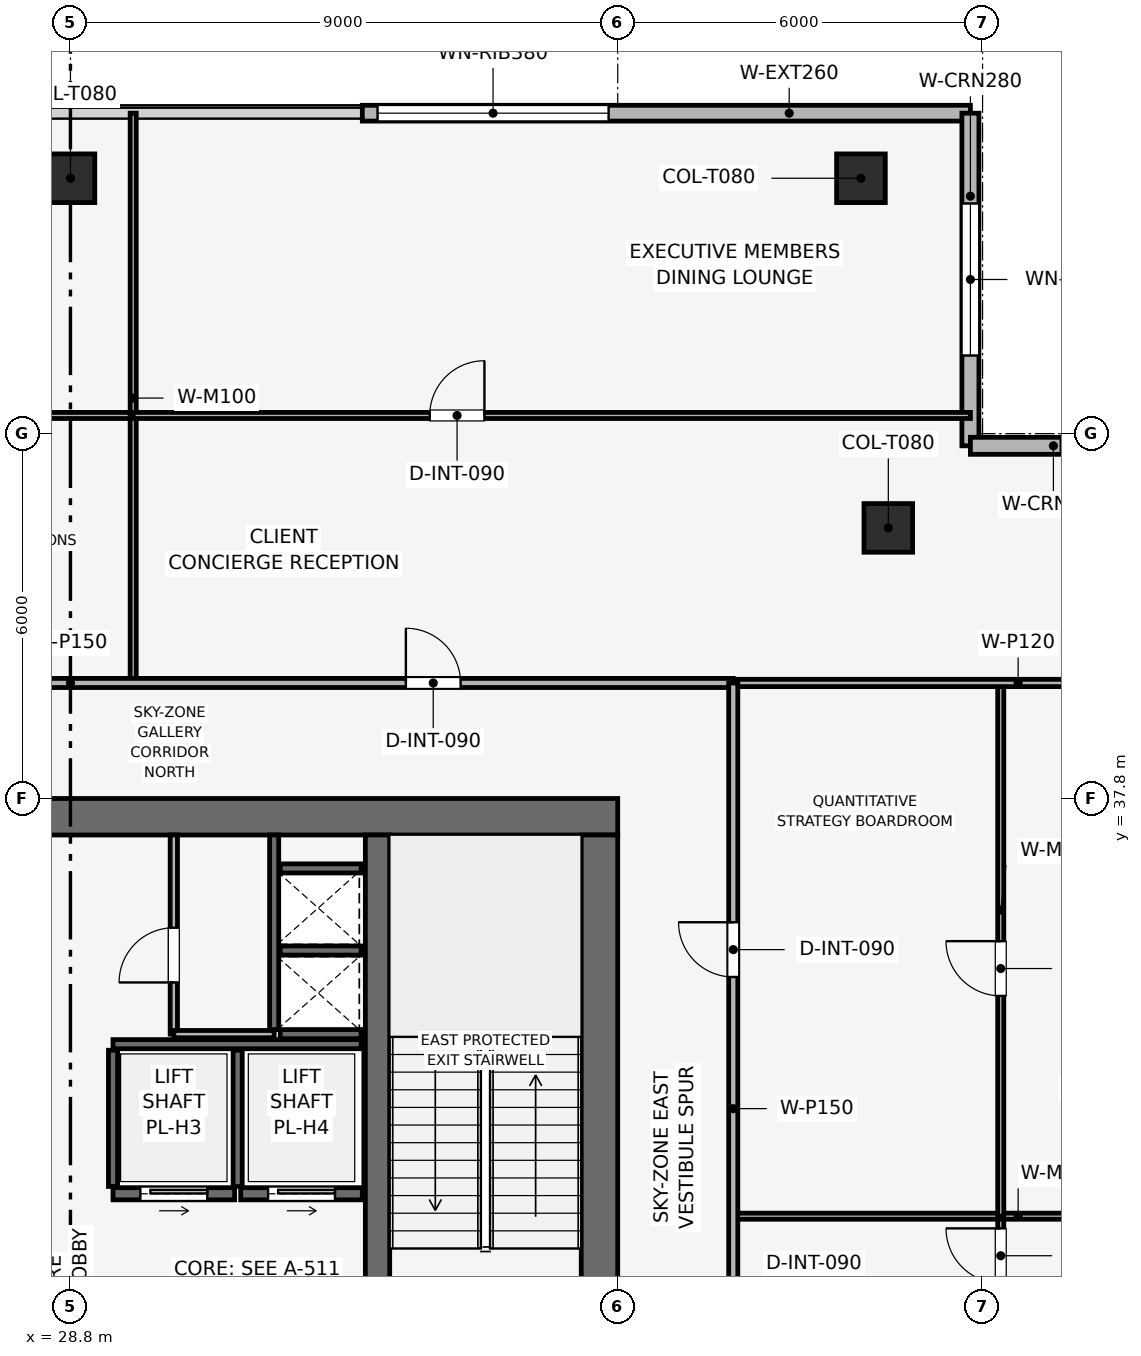
"""IFC4 building model, lengths in metres.
Left out: names, types, materials, properties, quantities, classifications, styles, units other than length and angle.
Written with IfcOpenShell. Run it as: python <this file> out.ifc"""

import sys

from ifc_helpers import new_model, si_unit, direction, frame, frame_2d, origin, origin_2d, place, context, subcontext, project, spatial, rectangle, extrude, element, fill, save


model = new_model("IFC4")
c1 = context("Model", 3, precision=1e-05, world=origin(), true_north=direction((0.0, 1.0)))
c2 = subcontext(c1, "Body", "Model", "MODEL_VIEW")
j1 = project(units=[si_unit("LENGTHUNIT", "METRE"), si_unit("PLANEANGLEUNIT", "RADIAN")], contexts=[c1])
p1 = place(None, origin())
s1 = spatial("IfcSite", under=j1, at=p1, CompositionType="ELEMENT")
p2 = place(p1, origin())
s2 = spatial("IfcBuilding", under=s1, at=p2, CompositionType="ELEMENT")
p3 = place(p2, frame((0.0, 0.0, 360.0)))
s3 = spatial("IfcBuildingStorey", under=s2, at=p3, CompositionType="ELEMENT", Elevation=360.0)
p4 = place(p3, frame((19.8, 37.5, 0.0), z_axis=(0.0, 0.0, 1.0), x_axis=(1.0, 0.0, 0.0)))
e1 = element("IfcWall", 1, at=p4, inside=s3, PredefinedType="SHEAR", context=c2, shape_type="SweptSolid", body=[
    extrude(rectangle(XDim=18.0, YDim=0.6, at=frame_2d((9.0, 0.0))), origin(), (0.0, 0.0, 1.0), 4.5),
])
p5 = place(p4, frame((7.05, 0.0, 0.0)))
e2 = element("IfcOpeningElement", 2, at=p5, cuts=e1, PredefinedType="OPENING", context=c2, shape_type="SweptSolid", body=[
    extrude(rectangle(XDim=1.1, YDim=2.15, at=frame_2d((0.55, 1.075))), frame((0.0, 0.31, 0.0), z_axis=(0.0, -1.0, 0.0), x_axis=(1.0, 0.0, 0.0)), (0.0, 0.0, 1.0), 0.62),
])
p6 = place(p3, frame((37.5, 20.4, 0.0), z_axis=(0.0, 0.0, 1.0), x_axis=(0.0, 1.0, 0.0)))
e3 = element("IfcWall", 3, at=p6, inside=s3, PredefinedType="SHEAR", context=c2, shape_type="SweptSolid", body=[
    extrude(rectangle(XDim=16.8, YDim=0.6, at=frame_2d((8.4, 0.0))), origin(), (0.0, 0.0, 1.0), 4.5),
])
p7 = place(p6, frame((4.9, 0.0, 0.0)))
e4 = element("IfcOpeningElement", 4, at=p7, cuts=e3, PredefinedType="OPENING", context=c2, shape_type="SweptSolid", body=[
    extrude(rectangle(XDim=1.1, YDim=2.15, at=frame_2d((0.55, 1.075))), frame((0.0, 0.31, 0.0), z_axis=(0.0, -1.0, 0.0), x_axis=(1.0, 0.0, 0.0)), (0.0, 0.0, 1.0), 0.62),
])
p8 = place(p3, frame((33.85, 20.4, 0.0), z_axis=(0.0, 0.0, 1.0), x_axis=(0.0, 1.0, 0.0)))
e5 = element("IfcWall", 5, at=p8, inside=s3, PredefinedType="SHEAR", context=c2, shape_type="SweptSolid", body=[
    extrude(rectangle(XDim=16.8, YDim=0.4, at=frame_2d((8.4, 0.0))), origin(), (0.0, 0.0, 1.0), 4.5),
])
for number, where, z_axis, x_axis in (
    (6, (41.8, 48.0, 0.003), (0.0, 0.0, 1.0), (1.0, 0.0, 0.0)),
    (7, (28.8, 48.0, 0.003), (0.0, 0.0, 1.0), (1.0, 0.0, 0.0)),
    (8, (42.25, 42.25, 0.003), (0.0, 0.0, 1.0), (1.0, 0.0, 0.0)),
):
    element("IfcColumn", number, at=place(p3, frame(where, z_axis=z_axis, x_axis=x_axis)), inside=s3, PredefinedType="COLUMN", context=c2, shape_type="SweptSolid", body=[
        extrude(rectangle(XDim=0.8, YDim=0.8, at=origin_2d()), origin(), (0.0, 0.0, 1.0), 4.234),
    ])
p9 = place(p3, frame((33.6, 49.07, 0.0), z_axis=(0.0, 0.0, 1.0), x_axis=(1.0, 0.0, 0.0)))
e9 = element("IfcWall", 9, at=p9, inside=s3, PredefinedType="SOLIDWALL", context=c2, shape_type="SweptSolid", body=[
    extrude(rectangle(XDim=10.0, YDim=0.26, at=frame_2d((5.0, 0.0))), origin(), (0.0, 0.0, 1.0), 4.24),
])
p10 = place(p9, frame((0.25, 0.0, 0.9)))
e10 = element("IfcOpeningElement", 10, at=p10, cuts=e9, PredefinedType="OPENING", context=c2, shape_type="SweptSolid", body=[
    extrude(rectangle(XDim=3.8, YDim=1.9, at=frame_2d((1.9, 0.95))), frame((0.0, 0.14, 0.0), z_axis=(0.0, -1.0, 0.0), x_axis=(1.0, 0.0, 0.0)), (0.0, 0.0, 1.0), 0.28),
])
p11 = place(p3, frame((43.6, 49.07, 0.0), z_axis=(0.0, 0.0, 1.0), x_axis=(0.0, -1.0, 0.0)))
e11 = element("IfcWall", 11, at=p11, inside=s3, PredefinedType="SOLIDWALL", context=c2, shape_type="SweptSolid", body=[
    extrude(rectangle(XDim=5.47, YDim=0.28, at=frame_2d((2.735, 0.0))), origin(), (0.0, 0.0, 1.0), 4.24),
])
p12 = place(p11, frame((1.485, 0.0, 0.9)))
e12 = element("IfcOpeningElement", 12, at=p12, cuts=e11, PredefinedType="OPENING", context=c2, shape_type="SweptSolid", body=[
    extrude(rectangle(XDim=2.5, YDim=1.9, at=frame_2d((1.25, 0.95))), frame((0.0, 0.15, 0.0), z_axis=(0.0, -1.0, 0.0), x_axis=(1.0, 0.0, 0.0)), (0.0, 0.0, 1.0), 0.3),
])
p13 = place(p3, frame((43.6, 43.6, 0.0), z_axis=(0.0, 0.0, 1.0), x_axis=(1.0, 0.0, 0.0)))
e13 = element("IfcWall", 13, at=p13, inside=s3, PredefinedType="SOLIDWALL", context=c2, shape_type="SweptSolid", body=[
    extrude(rectangle(XDim=5.47, YDim=0.28, at=frame_2d((2.735, 0.0))), origin(), (0.0, 0.0, 1.0), 4.24),
])
p14 = place(p13, frame((1.485, 0.0, 0.9)))
e14 = element("IfcOpeningElement", 14, at=p14, cuts=e13, PredefinedType="OPENING", context=c2, shape_type="SweptSolid", body=[
    extrude(rectangle(XDim=2.5, YDim=1.9, at=frame_2d((1.25, 0.95))), frame((0.0, 0.15, 0.0), z_axis=(0.0, -1.0, 0.0), x_axis=(1.0, 0.0, 0.0)), (0.0, 0.0, 1.0), 0.3),
])
p15 = place(p3, frame((32.15, 34.0, 0.0), z_axis=(0.0, 0.0, 1.0), x_axis=(0.0, 1.0, 0.0)))
e15 = element("IfcWall", 15, at=p15, inside=s3, PredefinedType="SHEAR", context=c2, shape_type="SweptSolid", body=[
    extrude(rectangle(XDim=3.2, YDim=0.15, at=frame_2d((1.6, 0.0))), origin(), (0.0, 0.0, 1.0), 4.24),
])
for number, where, z_axis, x_axis in (
    (16, (32.25, 33.925, 0.0), (0.0, 0.0, 1.0), (1.0, 0.0, 0.0)),
    (17, (32.25, 35.3, 0.0), (0.0, 0.0, 1.0), (1.0, 0.0, 0.0)),
):
    element("IfcWall", number, at=place(p3, frame(where, z_axis=z_axis, x_axis=x_axis)), inside=s3, PredefinedType="SHEAR", context=c2, shape_type="SweptSolid", body=[
        extrude(rectangle(XDim=1.33, YDim=0.15, at=frame_2d((0.665, 0.0))), origin(), (0.0, 0.0, 1.0), 4.24),
    ])
p16 = place(p3, frame((29.5, 31.3, 0.0), z_axis=(0.0, 0.0, 1.0), x_axis=(1.0, 0.0, 0.0)))
e18 = element("IfcWall", 18, at=p16, inside=s3, PredefinedType="SHEAR", context=c2, shape_type="SweptSolid", body=[
    extrude(rectangle(XDim=2.0, YDim=0.2, at=frame_2d((1.0, 0.0))), origin(), (0.0, 0.0, 1.0), 4.24),
])
p17 = place(p16, frame((0.45, 0.0, 0.0)))
e19 = element("IfcOpeningElement", 19, at=p17, cuts=e18, PredefinedType="OPENING", context=c2, shape_type="SweptSolid", body=[
    extrude(rectangle(XDim=1.1, YDim=2.15, at=frame_2d((0.55, 1.075))), frame((0.0, 0.11, 0.0), z_axis=(0.0, -1.0, 0.0), x_axis=(1.0, 0.0, 0.0)), (0.0, 0.0, 1.0), 0.22),
])
p18 = place(p3, frame((31.6, 31.3, 0.0), z_axis=(0.0, 0.0, 1.0), x_axis=(1.0, 0.0, 0.0)))
e20 = element("IfcWall", 20, at=p18, inside=s3, PredefinedType="SHEAR", context=c2, shape_type="SweptSolid", body=[
    extrude(rectangle(XDim=2.0, YDim=0.2, at=frame_2d((1.0, 0.0))), origin(), (0.0, 0.0, 1.0), 4.24),
])
p19 = place(p18, frame((0.45, 0.0, 0.0)))
e21 = element("IfcOpeningElement", 21, at=p19, cuts=e20, PredefinedType="OPENING", context=c2, shape_type="SweptSolid", body=[
    extrude(rectangle(XDim=1.1, YDim=2.15, at=frame_2d((0.55, 1.075))), frame((0.0, 0.11, 0.0), z_axis=(0.0, -1.0, 0.0), x_axis=(1.0, 0.0, 0.0)), (0.0, 0.0, 1.0), 0.22),
])
p20 = place(p3, frame((32.25, 36.65, 0.0), z_axis=(0.0, 0.0, 1.0), x_axis=(1.0, 0.0, 0.0)))
e22 = element("IfcWall", 22, at=p20, inside=s3, PredefinedType="SHEAR", context=c2, shape_type="SweptSolid", body=[
    extrude(rectangle(XDim=1.33, YDim=0.15, at=frame_2d((0.665, 0.0))), origin(), (0.0, 0.0, 1.0), 4.24),
])
p21 = place(p3, frame((29.5, 33.76, 0.0), z_axis=(0.0, 0.0, 1.0), x_axis=(1.0, 0.0, 0.0)))
e23 = element("IfcWall", 23, at=p21, inside=s3, PredefinedType="SHEAR", context=c2, shape_type="SweptSolid", body=[
    extrude(rectangle(XDim=4.08, YDim=0.15, at=frame_2d((2.04, 0.0))), origin(), (0.0, 0.0, 1.0), 4.24),
])
for number, where, z_axis, x_axis in (
    (24, (29.5, 31.42, 0.0), (0.0, 0.0, 1.0), (0.0, 1.0, 0.0)),
    (25, (31.55, 31.42, 0.0), (0.0, 0.0, 1.0), (0.0, 1.0, 0.0)),
):
    element("IfcWall", number, at=place(p3, frame(where, z_axis=z_axis, x_axis=x_axis)), inside=s3, PredefinedType="SHEAR", context=c2, shape_type="SweptSolid", body=[
        extrude(rectangle(XDim=2.24, YDim=0.15, at=frame_2d((1.12, 0.0))), origin(), (0.0, 0.0, 1.0), 4.24),
    ])
p22 = place(p3, frame((30.5, 33.925, 0.0), z_axis=(0.0, 0.0, 1.0), x_axis=(0.0, 1.0, 0.0)))
e26 = element("IfcWall", 26, at=p22, inside=s3, PredefinedType="PARTITIONING", context=c2, shape_type="SweptSolid", body=[
    extrude(rectangle(XDim=3.275, YDim=0.12, at=frame_2d((1.637, 0.0))), origin(), (0.0, 0.0, 1.0), 4.24),
])
p23 = place(p22, frame((0.85, 0.0, 0.0)))
e27 = element("IfcOpeningElement", 27, at=p23, cuts=e26, PredefinedType="OPENING", context=c2, shape_type="SweptSolid", body=[
    extrude(rectangle(XDim=0.9, YDim=2.1, at=frame_2d((0.45, 1.05))), frame((0.0, 0.07, 0.0), z_axis=(0.0, -1.0, 0.0), x_axis=(1.0, 0.0, 0.0)), (0.0, 0.0, 1.0), 0.14),
])
p24 = place(p3, frame((30.5, 33.925, 0.0), z_axis=(0.0, 0.0, 1.0), x_axis=(1.0, 0.0, 0.0)))
e28 = element("IfcWall", 28, at=p24, inside=s3, PredefinedType="PARTITIONING", context=c2, shape_type="SweptSolid", body=[
    extrude(rectangle(XDim=1.65, YDim=0.12, at=frame_2d((0.825, 0.0))), origin(), (0.0, 0.0, 1.0), 4.24),
])
p25 = place(p3, frame((14.0, 44.099, 0.0), z_axis=(0.0, 0.0, 1.0), x_axis=(1.0, 0.0, 0.0)))
e29 = element("IfcWall", 29, at=p25, inside=s3, PredefinedType="MOVABLE", context=c2, shape_type="SweptSolid", body=[
    extrude(rectangle(XDim=15.832, YDim=0.1, at=frame_2d((7.916, 0.0))), origin(), (0.0, 0.0, 1.0), 3.825),
])
p26 = place(p25, frame((8.072, 0.0, 0.0)))
e30 = element("IfcOpeningElement", 30, at=p26, cuts=e29, PredefinedType="OPENING", context=c2, shape_type="SweptSolid", body=[
    extrude(rectangle(XDim=0.9, YDim=2.1, at=frame_2d((0.45, 1.05))), frame((0.0, 0.06, 0.0), z_axis=(0.0, -1.0, 0.0), x_axis=(1.0, 0.0, 0.0)), (0.0, 0.0, 1.0), 0.12),
])
p27 = place(p3, frame((29.832, 39.7, 0.0), z_axis=(0.0, 0.0, 1.0), x_axis=(0.0, 1.0, 0.0)))
e31 = element("IfcWall", 31, at=p27, inside=s3, PredefinedType="MOVABLE", context=c2, shape_type="SweptSolid", body=[
    extrude(rectangle(XDim=9.37, YDim=0.1, at=frame_2d((4.685, 0.0))), origin(), (0.0, 0.0, 1.0), 3.865),
])
p28 = place(p3, frame((29.832, 44.099, 0.0), z_axis=(0.0, 0.0, 1.0), x_axis=(1.0, 0.0, 0.0)))
e32 = element("IfcWall", 32, at=p28, inside=s3, PredefinedType="MOVABLE", context=c2, shape_type="SweptSolid", body=[
    extrude(rectangle(XDim=13.768, YDim=0.1, at=frame_2d((6.884, 0.0))), origin(), (0.0, 0.0, 1.0), 3.825),
])
p29 = place(p28, frame((4.876, 0.0, 0.0)))
e33 = element("IfcOpeningElement", 33, at=p29, cuts=e32, PredefinedType="OPENING", context=c2, shape_type="SweptSolid", body=[
    extrude(rectangle(XDim=0.9, YDim=2.1, at=frame_2d((0.45, 1.05))), frame((0.0, 0.06, 0.0), z_axis=(0.0, -1.0, 0.0), x_axis=(1.0, 0.0, 0.0)), (0.0, 0.0, 1.0), 0.12),
])
p30 = place(p3, frame((44.099, 26.7, 0.0), z_axis=(0.0, 0.0, 1.0), x_axis=(0.0, 1.0, 0.0)))
e34 = element("IfcWall", 34, at=p30, inside=s3, PredefinedType="MOVABLE", context=c2, shape_type="SweptSolid", body=[
    extrude(rectangle(XDim=4.231, YDim=0.1, at=frame_2d((2.115, 0.0))), origin(), (0.0, 0.0, 1.0), 3.825),
])
p31 = place(p30, frame((3.131, 0.0, 0.0)))
e35 = element("IfcOpeningElement", 35, at=p31, cuts=e34, PredefinedType="OPENING", context=c2, shape_type="SweptSolid", body=[
    extrude(rectangle(XDim=0.9, YDim=2.1, at=frame_2d((0.45, 1.05))), frame((0.0, 0.06, 0.0), z_axis=(0.0, -1.0, 0.0), x_axis=(1.0, 0.0, 0.0)), (0.0, 0.0, 1.0), 0.12),
])
p32 = place(p3, frame((39.7, 30.931, 0.0), z_axis=(0.0, 0.0, 1.0), x_axis=(1.0, 0.0, 0.0)))
e36 = element("IfcWall", 36, at=p32, inside=s3, PredefinedType="MOVABLE", context=c2, shape_type="SweptSolid", body=[
    extrude(rectangle(XDim=9.37, YDim=0.1, at=frame_2d((4.685, 0.0))), origin(), (0.0, 0.0, 1.0), 3.865),
])
p33 = place(p3, frame((44.099, 30.931, 0.0), z_axis=(0.0, 0.0, 1.0), x_axis=(0.0, 1.0, 0.0)))
e37 = element("IfcWall", 37, at=p33, inside=s3, PredefinedType="MOVABLE", context=c2, shape_type="SweptSolid", body=[
    extrude(rectangle(XDim=8.769, YDim=0.1, at=frame_2d((4.385, 0.0))), origin(), (0.0, 0.0, 1.0), 3.825),
])
p34 = place(p33, frame((3.623, 0.0, 0.0)))
e38 = element("IfcOpeningElement", 38, at=p34, cuts=e37, PredefinedType="OPENING", context=c2, shape_type="SweptSolid", body=[
    extrude(rectangle(XDim=0.9, YDim=2.1, at=frame_2d((0.45, 1.05))), frame((0.0, 0.06, 0.0), z_axis=(0.0, -1.0, 0.0), x_axis=(1.0, 0.0, 0.0)), (0.0, 0.0, 1.0), 0.12),
])
p35 = place(p3, frame((39.7, 39.7, 0.0), z_axis=(0.0, 0.0, 1.0), x_axis=(1.0, 0.0, 0.0)))
e39 = element("IfcWall", 39, at=p35, inside=s3, PredefinedType="PARTITIONING", context=c2, shape_type="SweptSolid", body=[
    extrude(rectangle(XDim=9.37, YDim=0.12, at=frame_2d((4.685, 0.0))), origin(), (0.0, 0.0, 1.0), 3.825),
])
p36 = place(p3, frame((17.9, 39.7, 0.0), z_axis=(0.0, 0.0, 1.0), x_axis=(1.0, 0.0, 0.0)))
e40 = element("IfcWall", 40, at=p36, inside=s3, PredefinedType="PARTITIONING", context=c2, shape_type="SweptSolid", body=[
    extrude(rectangle(XDim=21.8, YDim=0.15, at=frame_2d((10.9, 0.0))), origin(), (0.0, 0.0, 1.0), 3.825),
])
p37 = place(p36, frame((5.516, 0.0, 0.0)))
e41 = element("IfcOpeningElement", 41, at=p37, cuts=e40, PredefinedType="OPENING", context=c2, shape_type="SweptSolid", body=[
    extrude(rectangle(XDim=0.9, YDim=2.1, at=frame_2d((0.45, 1.05))), frame((0.0, 0.085, 0.0), z_axis=(0.0, -1.0, 0.0), x_axis=(1.0, 0.0, 0.0)), (0.0, 0.0, 1.0), 0.17),
])
p38 = place(p36, frame((16.416, 0.0, 0.0)))
e42 = element("IfcOpeningElement", 42, at=p38, cuts=e40, PredefinedType="OPENING", context=c2, shape_type="SweptSolid", body=[
    extrude(rectangle(XDim=0.9, YDim=2.1, at=frame_2d((0.45, 1.05))), frame((0.0, 0.085, 0.0), z_axis=(0.0, -1.0, 0.0), x_axis=(1.0, 0.0, 0.0)), (0.0, 0.0, 1.0), 0.17),
])
p39 = place(p3, frame((39.7, 24.4, 0.0), z_axis=(0.0, 0.0, 1.0), x_axis=(0.0, 1.0, 0.0)))
e43 = element("IfcWall", 43, at=p39, inside=s3, PredefinedType="PARTITIONING", context=c2, shape_type="SweptSolid", body=[
    extrude(rectangle(XDim=15.3, YDim=0.15, at=frame_2d((7.65, 0.0))), origin(), (0.0, 0.0, 1.0), 3.825),
])
p40 = place(p39, frame((0.7, 0.0, 0.0)))
e44 = element("IfcOpeningElement", 44, at=p40, cuts=e43, PredefinedType="OPENING", context=c2, shape_type="SweptSolid", body=[
    extrude(rectangle(XDim=0.9, YDim=2.1, at=frame_2d((0.45, 1.05))), frame((0.0, 0.085, 0.0), z_axis=(0.0, -1.0, 0.0), x_axis=(1.0, 0.0, 0.0)), (0.0, 0.0, 1.0), 0.17),
])
p41 = place(p39, frame((3.966, 0.0, 0.0)))
e45 = element("IfcOpeningElement", 45, at=p41, cuts=e43, PredefinedType="OPENING", context=c2, shape_type="SweptSolid", body=[
    extrude(rectangle(XDim=0.9, YDim=2.1, at=frame_2d((0.45, 1.05))), frame((0.0, 0.085, 0.0), z_axis=(0.0, -1.0, 0.0), x_axis=(1.0, 0.0, 0.0)), (0.0, 0.0, 1.0), 0.17),
])
p42 = place(p39, frame((10.465, 0.0, 0.0)))
e46 = element("IfcOpeningElement", 46, at=p42, cuts=e43, PredefinedType="OPENING", context=c2, shape_type="SweptSolid", body=[
    extrude(rectangle(XDim=0.9, YDim=2.1, at=frame_2d((0.45, 1.05))), frame((0.0, 0.085, 0.0), z_axis=(0.0, -1.0, 0.0), x_axis=(1.0, 0.0, 0.0)), (0.0, 0.0, 1.0), 0.17),
])
p43 = place(p10, origin())
e47 = element("IfcWindow", 47, at=p43, inside=s3, PartitioningType="SINGLE_PANEL", PredefinedType="WINDOW", context=c2, shape_type="SweptSolid", body=[
    extrude(rectangle(XDim=3.8, YDim=1.9, at=frame_2d((1.9, 0.95))), frame((0.0, 0.03, 0.0), z_axis=(0.0, -1.0, 0.0), x_axis=(1.0, 0.0, 0.0)), (0.0, 0.0, 1.0), 0.06),
])
fill(e10, e47)
p44 = place(p12, origin())
e48 = element("IfcWindow", 48, at=p44, inside=s3, PartitioningType="SINGLE_PANEL", PredefinedType="WINDOW", context=c2, shape_type="SweptSolid", body=[
    extrude(rectangle(XDim=2.5, YDim=1.9, at=frame_2d((1.25, 0.95))), frame((0.0, 0.03, 0.0), z_axis=(0.0, -1.0, 0.0), x_axis=(1.0, 0.0, 0.0)), (0.0, 0.0, 1.0), 0.06),
])
fill(e12, e48)
p45 = place(p14, origin())
e49 = element("IfcWindow", 49, at=p45, inside=s3, PartitioningType="SINGLE_PANEL", PredefinedType="WINDOW", context=c2, shape_type="SweptSolid", body=[
    extrude(rectangle(XDim=2.5, YDim=1.9, at=frame_2d((1.25, 0.95))), frame((0.0, 0.03, 0.0), z_axis=(0.0, -1.0, 0.0), x_axis=(1.0, 0.0, 0.0)), (0.0, 0.0, 1.0), 0.06),
])
fill(e14, e49)
p46 = place(p17, origin())
e50 = element("IfcDoor", 50, at=p46, inside=s3, OperationType="SLIDING_TO_RIGHT", PredefinedType="DOOR", context=c2, shape_type="SweptSolid", body=[
    extrude(rectangle(XDim=1.1, YDim=2.15, at=frame_2d((0.55, 1.075))), frame((0.0, 0.025, 0.0), z_axis=(0.0, -1.0, 0.0), x_axis=(1.0, 0.0, 0.0)), (0.0, 0.0, 1.0), 0.05),
])
fill(e19, e50)
p47 = place(p19, origin())
e51 = element("IfcDoor", 51, at=p47, inside=s3, OperationType="SLIDING_TO_RIGHT", PredefinedType="DOOR", context=c2, shape_type="SweptSolid", body=[
    extrude(rectangle(XDim=1.1, YDim=2.15, at=frame_2d((0.55, 1.075))), frame((0.0, 0.025, 0.0), z_axis=(0.0, -1.0, 0.0), x_axis=(1.0, 0.0, 0.0)), (0.0, 0.0, 1.0), 0.05),
])
fill(e21, e51)
p48 = place(p23, origin())
e52 = element("IfcDoor", 52, at=p48, inside=s3, OperationType="SINGLE_SWING_LEFT", PredefinedType="DOOR", context=c2, shape_type="SweptSolid", body=[
    extrude(rectangle(XDim=0.9, YDim=2.1, at=frame_2d((0.45, 1.05))), frame((0.0, 0.025, 0.0), z_axis=(0.0, -1.0, 0.0), x_axis=(1.0, 0.0, 0.0)), (0.0, 0.0, 1.0), 0.05),
])
fill(e27, e52)
p49 = place(p29, origin())
e53 = element("IfcDoor", 53, at=p49, inside=s3, OperationType="SINGLE_SWING_RIGHT", PredefinedType="DOOR", context=c2, shape_type="SweptSolid", body=[
    extrude(rectangle(XDim=0.9, YDim=2.1, at=frame_2d((0.45, 1.05))), frame((0.0, 0.025, 0.0), z_axis=(0.0, -1.0, 0.0), x_axis=(1.0, 0.0, 0.0)), (0.0, 0.0, 1.0), 0.05),
])
fill(e33, e53)
p50 = place(p31, origin())
e54 = element("IfcDoor", 54, at=p50, inside=s3, OperationType="SINGLE_SWING_RIGHT", PredefinedType="DOOR", context=c2, shape_type="SweptSolid", body=[
    extrude(rectangle(XDim=0.9, YDim=2.1, at=frame_2d((0.45, 1.05))), frame((0.0, 0.025, 0.0), z_axis=(0.0, -1.0, 0.0), x_axis=(1.0, 0.0, 0.0)), (0.0, 0.0, 1.0), 0.05),
])
fill(e35, e54)
p51 = place(p34, origin())
e55 = element("IfcDoor", 55, at=p51, inside=s3, OperationType="SINGLE_SWING_RIGHT", PredefinedType="DOOR", context=c2, shape_type="SweptSolid", body=[
    extrude(rectangle(XDim=0.9, YDim=2.1, at=frame_2d((0.45, 1.05))), frame((0.0, 0.025, 0.0), z_axis=(0.0, -1.0, 0.0), x_axis=(1.0, 0.0, 0.0)), (0.0, 0.0, 1.0), 0.05),
])
fill(e38, e55)
p52 = place(p38, origin())
e56 = element("IfcDoor", 56, at=p52, inside=s3, OperationType="SINGLE_SWING_LEFT", PredefinedType="DOOR", context=c2, shape_type="SweptSolid", body=[
    extrude(rectangle(XDim=0.9, YDim=2.1, at=frame_2d((0.45, 1.05))), frame((0.0, 0.025, 0.0), z_axis=(0.0, -1.0, 0.0), x_axis=(1.0, 0.0, 0.0)), (0.0, 0.0, 1.0), 0.05),
])
fill(e42, e56)
p53 = place(p42, origin())
e57 = element("IfcDoor", 57, at=p53, inside=s3, OperationType="SINGLE_SWING_RIGHT", PredefinedType="DOOR", context=c2, shape_type="SweptSolid", body=[
    extrude(rectangle(XDim=0.9, YDim=2.1, at=frame_2d((0.45, 1.05))), frame((0.0, 0.025, 0.0), z_axis=(0.0, -1.0, 0.0), x_axis=(1.0, 0.0, 0.0)), (0.0, 0.0, 1.0), 0.05),
])
fill(e46, e57)
save(model, sys.argv[1])
